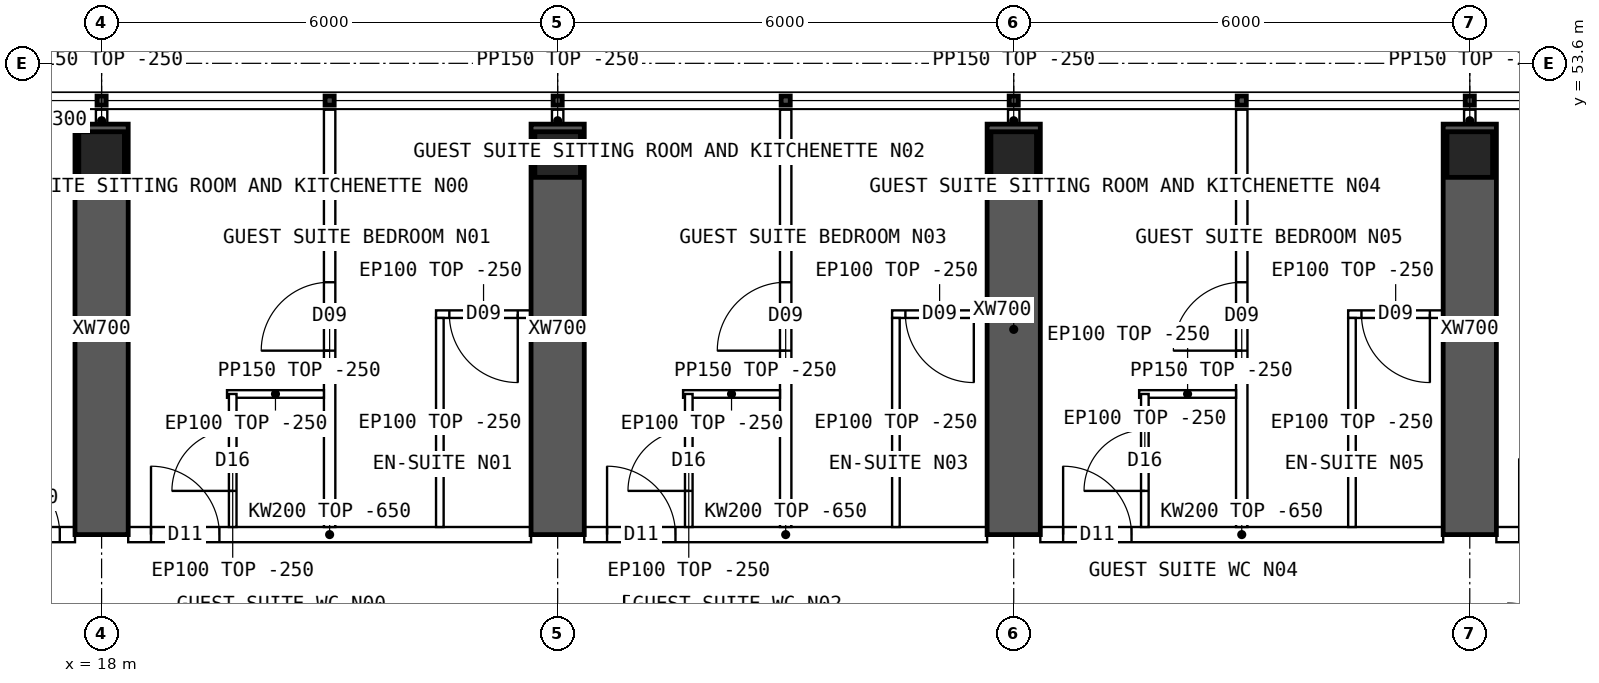
"""IFC4 building model, lengths in metres.
Left out: names, types, materials, properties, quantities, classifications, styles, units other than length and angle.
Written with IfcOpenShell. Run it as: python <this file> out.ifc"""

import sys

from ifc_helpers import new_model, si_unit, direction, frame, frame_2d, origin, origin_2d, place, context, subcontext, project, spatial, polyline, rectangle, hollow_rectangle, outline, extrude, element, fill, save


model = new_model("IFC4")
c1 = context("Model", 3, precision=1e-05, world=origin(), true_north=direction((0.0, 1.0)))
c2 = subcontext(c1, "Body", "Model", "MODEL_VIEW")
j1 = project(units=[si_unit("LENGTHUNIT", "METRE"), si_unit("PLANEANGLEUNIT", "RADIAN")], contexts=[c1])
p1 = place(None, origin())
s1 = spatial("IfcSite", under=j1, at=p1, CompositionType="ELEMENT")
p2 = place(p1, origin())
s2 = spatial("IfcBuilding", under=s1, at=p2, CompositionType="ELEMENT")
p3 = place(p2, frame((0.0, 0.0, 235.3)))
s3 = spatial("IfcBuildingStorey", under=s2, at=p3, CompositionType="ELEMENT", Elevation=235.3)
for number, where, z_axis, x_axis in (
    (1, (18.0, 52.4, 0.0), (0.0, 0.0, 1.0), (1.0, 0.0, 0.0)),
    (2, (24.0, 52.4, 0.0), (0.0, 0.0, 1.0), (1.0, 0.0, 0.0)),
    (3, (30.0, 52.4, 0.0), (0.0, 0.0, 1.0), (1.0, 0.0, 0.0)),
    (4, (36.0, 52.4, 0.0), (0.0, 0.0, 1.0), (1.0, 0.0, 0.0)),
):
    element("IfcColumn", number, at=place(p3, frame(where, z_axis=z_axis, x_axis=x_axis)), inside=s3, PredefinedType="COLUMN", context=c2, shape_type="SweptSolid", body=[
        extrude(hollow_rectangle(XDim=0.6, YDim=0.6, WallThickness=0.06, at=origin_2d()), origin(), (0.0, 0.0, 1.0), 3.75),
    ])
for number, where, z_axis, x_axis in (
    (5, (18.0, 47.4, 0.0), (0.0, 0.0, 1.0), (0.0, 1.0, 0.0)),
    (6, (24.0, 47.4, 0.0), (0.0, 0.0, 1.0), (0.0, 1.0, 0.0)),
    (7, (30.0, 47.4, 0.0), (0.0, 0.0, 1.0), (0.0, 1.0, 0.0)),
    (8, (36.0, 47.4, 0.0), (0.0, 0.0, 1.0), (0.0, 1.0, 0.0)),
):
    element("IfcWall", number, at=place(p3, frame(where, z_axis=z_axis, x_axis=x_axis)), inside=s3, PredefinedType="SHEAR", context=c2, shape_type="SweptSolid", body=[
        extrude(rectangle(XDim=5.4, YDim=0.7, at=frame_2d((2.7, 0.0))), origin(), (0.0, 0.0, 1.0), 3.75),
    ])
p4 = place(p3, frame((17.2, 52.85, 0.0), z_axis=(0.0, 0.0, 1.0), x_axis=(1.0, 0.0, 0.0)))
e9 = element("IfcWall", 9, at=p4, inside=s3, PredefinedType="SOLIDWALL", context=c2, shape_type="SweptSolid", body=[
    extrude(rectangle(XDim=0.45, YDim=0.3, at=frame_2d((0.225, 0.0))), origin(), (0.0, 0.0, 1.0), 3.5),
])
p5 = place(p3, frame((15.6, 47.4, 0.0), z_axis=(0.0, 0.0, 1.0), x_axis=(1.0, 0.0, 0.0)))
e10 = element("IfcWall", 10, at=p5, inside=s3, PredefinedType="SOLIDWALL", context=c2, shape_type="SweptSolid", body=[
    extrude(rectangle(XDim=2.05, YDim=0.2, at=frame_2d((1.025, 0.0))), origin(), (0.0, 0.0, 1.0), 3.5),
])
p6 = place(p5, frame((0.95, 0.0, 0.0)))
e11 = element("IfcOpeningElement", 11, at=p6, cuts=e10, PredefinedType="OPENING", context=c2, shape_type="SweptSolid", body=[
    extrude(rectangle(XDim=0.9, YDim=2.1, at=frame_2d((0.45, 1.05))), frame((0.0, 0.11, 0.0), z_axis=(0.0, -1.0, 0.0), x_axis=(1.0, 0.0, 0.0)), (0.0, 0.0, 1.0), 0.22),
])
p7 = place(p3, frame((18.35, 47.4, 0.0), z_axis=(0.0, 0.0, 1.0), x_axis=(1.0, 0.0, 0.0)))
e12 = element("IfcWall", 12, at=p7, inside=s3, PredefinedType="SOLIDWALL", context=c2, shape_type="SweptSolid", body=[
    extrude(outline(polyline([(0.0, 0.0), (5.3, 0.0), (5.3, 3.1), (0.0, 3.1), (0.0, 0.0)])), frame((0.0, 0.1, 0.0), z_axis=(0.0, -1.0, 0.0), x_axis=(1.0, 0.0, 0.0)), (0.0, 0.0, 1.0), 0.2),
])
p8 = place(p7, frame((0.3, 0.0, 0.0)))
e13 = element("IfcOpeningElement", 13, at=p8, cuts=e12, PredefinedType="OPENING", context=c2, shape_type="SweptSolid", body=[
    extrude(rectangle(XDim=0.9, YDim=2.1, at=frame_2d((0.45, 1.05))), frame((0.0, 0.11, 0.0), z_axis=(0.0, -1.0, 0.0), x_axis=(1.0, 0.0, 0.0)), (0.0, 0.0, 1.0), 0.22),
])
p9 = place(p3, frame((24.35, 47.4, 0.0), z_axis=(0.0, 0.0, 1.0), x_axis=(1.0, 0.0, 0.0)))
e14 = element("IfcWall", 14, at=p9, inside=s3, PredefinedType="SOLIDWALL", context=c2, shape_type="SweptSolid", body=[
    extrude(outline(polyline([(0.0, 0.0), (5.3, 0.0), (5.3, 3.1), (0.0, 3.1), (0.0, 0.0)])), frame((0.0, 0.1, 0.0), z_axis=(0.0, -1.0, 0.0), x_axis=(1.0, 0.0, 0.0)), (0.0, 0.0, 1.0), 0.2),
])
p10 = place(p9, frame((0.3, 0.0, 0.0)))
e15 = element("IfcOpeningElement", 15, at=p10, cuts=e14, PredefinedType="OPENING", context=c2, shape_type="SweptSolid", body=[
    extrude(rectangle(XDim=0.9, YDim=2.1, at=frame_2d((0.45, 1.05))), frame((0.0, 0.11, 0.0), z_axis=(0.0, -1.0, 0.0), x_axis=(1.0, 0.0, 0.0)), (0.0, 0.0, 1.0), 0.22),
])
p11 = place(p3, frame((30.35, 47.4, 0.0), z_axis=(0.0, 0.0, 1.0), x_axis=(1.0, 0.0, 0.0)))
e16 = element("IfcWall", 16, at=p11, inside=s3, PredefinedType="SOLIDWALL", context=c2, shape_type="SweptSolid", body=[
    extrude(outline(polyline([(0.0, 0.0), (5.3, 0.0), (5.3, 3.1), (0.0, 3.1), (0.0, 0.0)])), frame((0.0, 0.1, 0.0), z_axis=(0.0, -1.0, 0.0), x_axis=(1.0, 0.0, 0.0)), (0.0, 0.0, 1.0), 0.2),
])
p12 = place(p11, frame((0.3, 0.0, 0.0)))
e17 = element("IfcOpeningElement", 17, at=p12, cuts=e16, PredefinedType="OPENING", context=c2, shape_type="SweptSolid", body=[
    extrude(rectangle(XDim=0.9, YDim=2.1, at=frame_2d((0.45, 1.05))), frame((0.0, 0.11, 0.0), z_axis=(0.0, -1.0, 0.0), x_axis=(1.0, 0.0, 0.0)), (0.0, 0.0, 1.0), 0.22),
])
p13 = place(p3, frame((36.35, 47.4, 0.0), z_axis=(0.0, 0.0, 1.0), x_axis=(1.0, 0.0, 0.0)))
e18 = element("IfcWall", 18, at=p13, inside=s3, PredefinedType="SOLIDWALL", context=c2, shape_type="SweptSolid", body=[
    extrude(outline(polyline([(0.0, 0.0), (5.3, 0.0), (5.3, 3.1), (0.0, 3.1), (0.0, 0.0)])), frame((0.0, 0.1, 0.0), z_axis=(0.0, -1.0, 0.0), x_axis=(1.0, 0.0, 0.0)), (0.0, 0.0, 1.0), 0.2),
])
p14 = place(p13, frame((0.3, 0.0, 0.0)))
e19 = element("IfcOpeningElement", 19, at=p14, cuts=e18, PredefinedType="OPENING", context=c2, shape_type="SweptSolid", body=[
    extrude(rectangle(XDim=1.0, YDim=2.1, at=frame_2d((0.5, 1.05))), frame((0.0, 0.11, 0.0), z_axis=(0.0, -1.0, 0.0), x_axis=(1.0, 0.0, 0.0)), (0.0, 0.0, 1.0), 0.22),
])
p15 = place(p3, frame((21.0, 52.99, 0.0), z_axis=(0.0, 0.0, 1.0), x_axis=(0.0, -1.0, 0.0)))
e20 = element("IfcWall", 20, at=p15, inside=s3, PredefinedType="PARTITIONING", context=c2, shape_type="SweptSolid", body=[
    extrude(outline(polyline([(0.0, 0.0), (5.49, 0.0), (5.49, 3.1), (5.442, 3.1), (5.44, 3.5), (0.792, 3.5), (0.79, 3.1), (0.392, 3.1), (0.39, 3.5), (0.0, 3.5), (0.0, 0.0)])), frame((0.0, 0.075, 0.0), z_axis=(0.0, -1.0, 0.0), x_axis=(1.0, 0.0, 0.0)), (0.0, 0.0, 1.0), 0.15),
])
p16 = place(p15, frame((2.27, 0.0, 0.0)))
e21 = element("IfcOpeningElement", 21, at=p16, cuts=e20, PredefinedType="OPENING", context=c2, shape_type="SweptSolid", body=[
    extrude(rectangle(XDim=0.9, YDim=2.1, at=frame_2d((0.45, 1.05))), frame((0.0, 0.085, 0.0), z_axis=(0.0, -1.0, 0.0), x_axis=(1.0, 0.0, 0.0)), (0.0, 0.0, 1.0), 0.17),
])
p17 = place(p3, frame((22.4, 50.3, 0.0), z_axis=(0.0, 0.0, 1.0), x_axis=(1.0, 0.0, 0.0)))
e22 = element("IfcWall", 22, at=p17, inside=s3, PredefinedType="PARTITIONING", context=c2, shape_type="SweptSolid", body=[
    extrude(rectangle(XDim=1.25, YDim=0.1, at=frame_2d((0.625, 0.0))), origin(), (0.0, 0.0, 1.0), 3.5),
])
p18 = place(p17, frame((0.175, 0.0, 0.0)))
e23 = element("IfcOpeningElement", 23, at=p18, cuts=e22, PredefinedType="OPENING", context=c2, shape_type="SweptSolid", body=[
    extrude(rectangle(XDim=0.9, YDim=2.1, at=frame_2d((0.45, 1.05))), frame((0.0, 0.06, 0.0), z_axis=(0.0, -1.0, 0.0), x_axis=(1.0, 0.0, 0.0)), (0.0, 0.0, 1.0), 0.12),
])
p19 = place(p3, frame((22.45, 50.25, 0.0), z_axis=(0.0, 0.0, 1.0), x_axis=(0.0, -1.0, 0.0)))
e24 = element("IfcWall", 24, at=p19, inside=s3, PredefinedType="PARTITIONING", context=c2, shape_type="SweptSolid", body=[
    extrude(outline(polyline([(0.0, 0.0), (2.75, 0.0), (2.75, 3.1), (2.702, 3.1), (2.7, 3.5), (0.0, 3.5), (0.0, 0.0)])), frame((0.0, 0.05, 0.0), z_axis=(0.0, -1.0, 0.0), x_axis=(1.0, 0.0, 0.0)), (0.0, 0.0, 1.0), 0.1),
])
p20 = place(p3, frame((19.65, 49.25, 0.0), z_axis=(0.0, 0.0, 1.0), x_axis=(1.0, 0.0, 0.0)))
e25 = element("IfcWall", 25, at=p20, inside=s3, PredefinedType="PARTITIONING", context=c2, shape_type="SweptSolid", body=[
    extrude(rectangle(XDim=1.275, YDim=0.1, at=frame_2d((0.638, 0.0))), origin(), (0.0, 0.0, 1.0), 3.5),
])
p21 = place(p3, frame((19.725, 49.25, 0.0), z_axis=(0.0, 0.0, 1.0), x_axis=(0.0, -1.0, 0.0)))
e26 = element("IfcWall", 26, at=p21, inside=s3, PredefinedType="PARTITIONING", context=c2, shape_type="SweptSolid", body=[
    extrude(outline(polyline([(0.0, 0.0), (1.75, 0.0), (1.75, 3.1), (1.702, 3.1), (1.7, 3.5), (0.0, 3.5), (0.0, 0.0)])), frame((0.0, 0.05, 0.0), z_axis=(0.0, -1.0, 0.0), x_axis=(1.0, 0.0, 0.0)), (0.0, 0.0, 1.0), 0.1),
])
p22 = place(p21, frame((0.475, 0.0, 0.0)))
e27 = element("IfcOpeningElement", 27, at=p22, cuts=e26, PredefinedType="OPENING", context=c2, shape_type="SweptSolid", body=[
    extrude(rectangle(XDim=0.8, YDim=2.1, at=frame_2d((0.4, 1.05))), frame((0.0, 0.06, 0.0), z_axis=(0.0, -1.0, 0.0), x_axis=(1.0, 0.0, 0.0)), (0.0, 0.0, 1.0), 0.12),
])
p23 = place(p3, frame((27.0, 52.99, 0.0), z_axis=(0.0, 0.0, 1.0), x_axis=(0.0, -1.0, 0.0)))
e28 = element("IfcWall", 28, at=p23, inside=s3, PredefinedType="PARTITIONING", context=c2, shape_type="SweptSolid", body=[
    extrude(outline(polyline([(0.0, 0.0), (5.49, 0.0), (5.49, 3.1), (5.442, 3.1), (5.44, 3.5), (0.792, 3.5), (0.79, 3.1), (0.392, 3.1), (0.39, 3.5), (0.0, 3.5), (0.0, 0.0)])), frame((0.0, 0.075, 0.0), z_axis=(0.0, -1.0, 0.0), x_axis=(1.0, 0.0, 0.0)), (0.0, 0.0, 1.0), 0.15),
])
p24 = place(p23, frame((2.27, 0.0, 0.0)))
e29 = element("IfcOpeningElement", 29, at=p24, cuts=e28, PredefinedType="OPENING", context=c2, shape_type="SweptSolid", body=[
    extrude(rectangle(XDim=0.9, YDim=2.1, at=frame_2d((0.45, 1.05))), frame((0.0, 0.085, 0.0), z_axis=(0.0, -1.0, 0.0), x_axis=(1.0, 0.0, 0.0)), (0.0, 0.0, 1.0), 0.17),
])
p25 = place(p3, frame((28.4, 50.3, 0.0), z_axis=(0.0, 0.0, 1.0), x_axis=(1.0, 0.0, 0.0)))
e30 = element("IfcWall", 30, at=p25, inside=s3, PredefinedType="PARTITIONING", context=c2, shape_type="SweptSolid", body=[
    extrude(rectangle(XDim=1.25, YDim=0.1, at=frame_2d((0.625, 0.0))), origin(), (0.0, 0.0, 1.0), 3.5),
])
p26 = place(p25, frame((0.175, 0.0, 0.0)))
e31 = element("IfcOpeningElement", 31, at=p26, cuts=e30, PredefinedType="OPENING", context=c2, shape_type="SweptSolid", body=[
    extrude(rectangle(XDim=0.9, YDim=2.1, at=frame_2d((0.45, 1.05))), frame((0.0, 0.06, 0.0), z_axis=(0.0, -1.0, 0.0), x_axis=(1.0, 0.0, 0.0)), (0.0, 0.0, 1.0), 0.12),
])
p27 = place(p3, frame((28.45, 50.25, 0.0), z_axis=(0.0, 0.0, 1.0), x_axis=(0.0, -1.0, 0.0)))
e32 = element("IfcWall", 32, at=p27, inside=s3, PredefinedType="PARTITIONING", context=c2, shape_type="SweptSolid", body=[
    extrude(outline(polyline([(0.0, 0.0), (2.75, 0.0), (2.75, 3.1), (2.702, 3.1), (2.7, 3.5), (0.0, 3.5), (0.0, 0.0)])), frame((0.0, 0.05, 0.0), z_axis=(0.0, -1.0, 0.0), x_axis=(1.0, 0.0, 0.0)), (0.0, 0.0, 1.0), 0.1),
])
p28 = place(p3, frame((25.65, 49.25, 0.0), z_axis=(0.0, 0.0, 1.0), x_axis=(1.0, 0.0, 0.0)))
e33 = element("IfcWall", 33, at=p28, inside=s3, PredefinedType="PARTITIONING", context=c2, shape_type="SweptSolid", body=[
    extrude(rectangle(XDim=1.275, YDim=0.1, at=frame_2d((0.638, 0.0))), origin(), (0.0, 0.0, 1.0), 3.5),
])
p29 = place(p3, frame((25.725, 49.25, 0.0), z_axis=(0.0, 0.0, 1.0), x_axis=(0.0, -1.0, 0.0)))
e34 = element("IfcWall", 34, at=p29, inside=s3, PredefinedType="PARTITIONING", context=c2, shape_type="SweptSolid", body=[
    extrude(outline(polyline([(0.0, 0.0), (1.75, 0.0), (1.75, 3.1), (1.702, 3.1), (1.7, 3.5), (0.0, 3.5), (0.0, 0.0)])), frame((0.0, 0.05, 0.0), z_axis=(0.0, -1.0, 0.0), x_axis=(1.0, 0.0, 0.0)), (0.0, 0.0, 1.0), 0.1),
])
p30 = place(p29, frame((0.475, 0.0, 0.0)))
e35 = element("IfcOpeningElement", 35, at=p30, cuts=e34, PredefinedType="OPENING", context=c2, shape_type="SweptSolid", body=[
    extrude(rectangle(XDim=0.8, YDim=2.1, at=frame_2d((0.4, 1.05))), frame((0.0, 0.06, 0.0), z_axis=(0.0, -1.0, 0.0), x_axis=(1.0, 0.0, 0.0)), (0.0, 0.0, 1.0), 0.12),
])
p31 = place(p3, frame((33.0, 52.99, 0.0), z_axis=(0.0, 0.0, 1.0), x_axis=(0.0, -1.0, 0.0)))
e36 = element("IfcWall", 36, at=p31, inside=s3, PredefinedType="PARTITIONING", context=c2, shape_type="SweptSolid", body=[
    extrude(outline(polyline([(0.0, 0.0), (5.49, 0.0), (5.49, 3.1), (5.442, 3.1), (5.44, 3.5), (0.792, 3.5), (0.79, 3.1), (0.392, 3.1), (0.39, 3.5), (0.0, 3.5), (0.0, 0.0)])), frame((0.0, 0.075, 0.0), z_axis=(0.0, -1.0, 0.0), x_axis=(1.0, 0.0, 0.0)), (0.0, 0.0, 1.0), 0.15),
])
p32 = place(p31, frame((2.27, 0.0, 0.0)))
e37 = element("IfcOpeningElement", 37, at=p32, cuts=e36, PredefinedType="OPENING", context=c2, shape_type="SweptSolid", body=[
    extrude(rectangle(XDim=0.9, YDim=2.1, at=frame_2d((0.45, 1.05))), frame((0.0, 0.085, 0.0), z_axis=(0.0, -1.0, 0.0), x_axis=(1.0, 0.0, 0.0)), (0.0, 0.0, 1.0), 0.17),
])
p33 = place(p3, frame((34.4, 50.3, 0.0), z_axis=(0.0, 0.0, 1.0), x_axis=(1.0, 0.0, 0.0)))
e38 = element("IfcWall", 38, at=p33, inside=s3, PredefinedType="PARTITIONING", context=c2, shape_type="SweptSolid", body=[
    extrude(rectangle(XDim=1.25, YDim=0.1, at=frame_2d((0.625, 0.0))), origin(), (0.0, 0.0, 1.0), 3.5),
])
p34 = place(p33, frame((0.175, 0.0, 0.0)))
e39 = element("IfcOpeningElement", 39, at=p34, cuts=e38, PredefinedType="OPENING", context=c2, shape_type="SweptSolid", body=[
    extrude(rectangle(XDim=0.9, YDim=2.1, at=frame_2d((0.45, 1.05))), frame((0.0, 0.06, 0.0), z_axis=(0.0, -1.0, 0.0), x_axis=(1.0, 0.0, 0.0)), (0.0, 0.0, 1.0), 0.12),
])
p35 = place(p3, frame((34.45, 50.25, 0.0), z_axis=(0.0, 0.0, 1.0), x_axis=(0.0, -1.0, 0.0)))
e40 = element("IfcWall", 40, at=p35, inside=s3, PredefinedType="PARTITIONING", context=c2, shape_type="SweptSolid", body=[
    extrude(outline(polyline([(0.0, 0.0), (2.75, 0.0), (2.75, 3.1), (2.702, 3.1), (2.7, 3.5), (0.0, 3.5), (0.0, 0.0)])), frame((0.0, 0.05, 0.0), z_axis=(0.0, -1.0, 0.0), x_axis=(1.0, 0.0, 0.0)), (0.0, 0.0, 1.0), 0.1),
])
p36 = place(p3, frame((31.65, 49.25, 0.0), z_axis=(0.0, 0.0, 1.0), x_axis=(1.0, 0.0, 0.0)))
e41 = element("IfcWall", 41, at=p36, inside=s3, PredefinedType="PARTITIONING", context=c2, shape_type="SweptSolid", body=[
    extrude(rectangle(XDim=1.275, YDim=0.1, at=frame_2d((0.638, 0.0))), origin(), (0.0, 0.0, 1.0), 3.5),
])
p37 = place(p3, frame((31.725, 49.25, 0.0), z_axis=(0.0, 0.0, 1.0), x_axis=(0.0, -1.0, 0.0)))
e42 = element("IfcWall", 42, at=p37, inside=s3, PredefinedType="PARTITIONING", context=c2, shape_type="SweptSolid", body=[
    extrude(outline(polyline([(0.0, 0.0), (1.75, 0.0), (1.75, 3.1), (1.702, 3.1), (1.7, 3.5), (0.0, 3.5), (0.0, 0.0)])), frame((0.0, 0.05, 0.0), z_axis=(0.0, -1.0, 0.0), x_axis=(1.0, 0.0, 0.0)), (0.0, 0.0, 1.0), 0.1),
])
p38 = place(p37, frame((0.475, 0.0, 0.0)))
e43 = element("IfcOpeningElement", 43, at=p38, cuts=e42, PredefinedType="OPENING", context=c2, shape_type="SweptSolid", body=[
    extrude(rectangle(XDim=0.8, YDim=2.1, at=frame_2d((0.4, 1.05))), frame((0.0, 0.06, 0.0), z_axis=(0.0, -1.0, 0.0), x_axis=(1.0, 0.0, 0.0)), (0.0, 0.0, 1.0), 0.12),
])
for number, where, z_axis, x_axis in (
    (44, (18.0, 52.7, 0.0), (0.0, 0.0, 1.0), (0.0, 1.0, 0.0)),
    (45, (24.0, 52.7, 0.0), (0.0, 0.0, 1.0), (0.0, 1.0, 0.0)),
    (46, (30.0, 52.7, 0.0), (0.0, 0.0, 1.0), (0.0, 1.0, 0.0)),
    (47, (36.0, 52.7, 0.0), (0.0, 0.0, 1.0), (0.0, 1.0, 0.0)),
):
    element("IfcWall", number, at=place(p3, frame(where, z_axis=z_axis, x_axis=x_axis)), inside=s3, PredefinedType="PARTITIONING", context=c2, shape_type="SweptSolid", body=[
        extrude(rectangle(XDim=0.29, YDim=0.15, at=frame_2d((0.145, 0.0))), origin(), (0.0, 0.0, 1.0), 3.5),
    ])
p39 = place(p8, origin())
e48 = element("IfcDoor", 48, at=p39, inside=s3, OperationType="SINGLE_SWING_LEFT", PredefinedType="DOOR", context=c2, shape_type="SweptSolid", body=[
    extrude(rectangle(XDim=0.9, YDim=2.1, at=frame_2d((0.45, 1.05))), frame((0.0, 0.025, 0.0), z_axis=(0.0, -1.0, 0.0), x_axis=(1.0, 0.0, 0.0)), (0.0, 0.0, 1.0), 0.05),
])
fill(e13, e48)
p40 = place(p18, origin())
e49 = element("IfcDoor", 49, at=p40, inside=s3, OperationType="SINGLE_SWING_RIGHT", PredefinedType="DOOR", context=c2, shape_type="SweptSolid", body=[
    extrude(rectangle(XDim=0.9, YDim=2.1, at=frame_2d((0.45, 1.05))), frame((0.0, 0.025, 0.0), z_axis=(0.0, -1.0, 0.0), x_axis=(1.0, 0.0, 0.0)), (0.0, 0.0, 1.0), 0.05),
])
fill(e23, e49)
p41 = place(p16, origin())
e50 = element("IfcDoor", 50, at=p41, inside=s3, OperationType="SINGLE_SWING_RIGHT", PredefinedType="DOOR", context=c2, shape_type="SweptSolid", body=[
    extrude(rectangle(XDim=0.9, YDim=2.1, at=frame_2d((0.45, 1.05))), frame((0.0, 0.025, 0.0), z_axis=(0.0, -1.0, 0.0), x_axis=(1.0, 0.0, 0.0)), (0.0, 0.0, 1.0), 0.05),
])
fill(e21, e50)
p42 = place(p22, origin())
e51 = element("IfcDoor", 51, at=p42, inside=s3, OperationType="SINGLE_SWING_RIGHT", PredefinedType="DOOR", context=c2, shape_type="SweptSolid", body=[
    extrude(rectangle(XDim=0.8, YDim=2.1, at=frame_2d((0.4, 1.05))), frame((0.0, 0.025, 0.0), z_axis=(0.0, -1.0, 0.0), x_axis=(1.0, 0.0, 0.0)), (0.0, 0.0, 1.0), 0.05),
])
fill(e27, e51)
p43 = place(p10, origin())
e52 = element("IfcDoor", 52, at=p43, inside=s3, OperationType="SINGLE_SWING_LEFT", PredefinedType="DOOR", context=c2, shape_type="SweptSolid", body=[
    extrude(rectangle(XDim=0.9, YDim=2.1, at=frame_2d((0.45, 1.05))), frame((0.0, 0.025, 0.0), z_axis=(0.0, -1.0, 0.0), x_axis=(1.0, 0.0, 0.0)), (0.0, 0.0, 1.0), 0.05),
])
fill(e15, e52)
p44 = place(p26, origin())
e53 = element("IfcDoor", 53, at=p44, inside=s3, OperationType="SINGLE_SWING_RIGHT", PredefinedType="DOOR", context=c2, shape_type="SweptSolid", body=[
    extrude(rectangle(XDim=0.9, YDim=2.1, at=frame_2d((0.45, 1.05))), frame((0.0, 0.025, 0.0), z_axis=(0.0, -1.0, 0.0), x_axis=(1.0, 0.0, 0.0)), (0.0, 0.0, 1.0), 0.05),
])
fill(e31, e53)
p45 = place(p24, origin())
e54 = element("IfcDoor", 54, at=p45, inside=s3, OperationType="SINGLE_SWING_RIGHT", PredefinedType="DOOR", context=c2, shape_type="SweptSolid", body=[
    extrude(rectangle(XDim=0.9, YDim=2.1, at=frame_2d((0.45, 1.05))), frame((0.0, 0.025, 0.0), z_axis=(0.0, -1.0, 0.0), x_axis=(1.0, 0.0, 0.0)), (0.0, 0.0, 1.0), 0.05),
])
fill(e29, e54)
p46 = place(p30, origin())
e55 = element("IfcDoor", 55, at=p46, inside=s3, OperationType="SINGLE_SWING_RIGHT", PredefinedType="DOOR", context=c2, shape_type="SweptSolid", body=[
    extrude(rectangle(XDim=0.8, YDim=2.1, at=frame_2d((0.4, 1.05))), frame((0.0, 0.025, 0.0), z_axis=(0.0, -1.0, 0.0), x_axis=(1.0, 0.0, 0.0)), (0.0, 0.0, 1.0), 0.05),
])
fill(e35, e55)
p47 = place(p12, origin())
e56 = element("IfcDoor", 56, at=p47, inside=s3, OperationType="SINGLE_SWING_LEFT", PredefinedType="DOOR", context=c2, shape_type="SweptSolid", body=[
    extrude(rectangle(XDim=0.9, YDim=2.1, at=frame_2d((0.45, 1.05))), frame((0.0, 0.025, 0.0), z_axis=(0.0, -1.0, 0.0), x_axis=(1.0, 0.0, 0.0)), (0.0, 0.0, 1.0), 0.05),
])
fill(e17, e56)
p48 = place(p34, origin())
e57 = element("IfcDoor", 57, at=p48, inside=s3, OperationType="SINGLE_SWING_RIGHT", PredefinedType="DOOR", context=c2, shape_type="SweptSolid", body=[
    extrude(rectangle(XDim=0.9, YDim=2.1, at=frame_2d((0.45, 1.05))), frame((0.0, 0.025, 0.0), z_axis=(0.0, -1.0, 0.0), x_axis=(1.0, 0.0, 0.0)), (0.0, 0.0, 1.0), 0.05),
])
fill(e39, e57)
p49 = place(p32, origin())
e58 = element("IfcDoor", 58, at=p49, inside=s3, OperationType="SINGLE_SWING_RIGHT", PredefinedType="DOOR", context=c2, shape_type="SweptSolid", body=[
    extrude(rectangle(XDim=0.9, YDim=2.1, at=frame_2d((0.45, 1.05))), frame((0.0, 0.025, 0.0), z_axis=(0.0, -1.0, 0.0), x_axis=(1.0, 0.0, 0.0)), (0.0, 0.0, 1.0), 0.05),
])
fill(e37, e58)
p50 = place(p38, origin())
e59 = element("IfcDoor", 59, at=p50, inside=s3, OperationType="SINGLE_SWING_RIGHT", PredefinedType="DOOR", context=c2, shape_type="SweptSolid", body=[
    extrude(rectangle(XDim=0.8, YDim=2.1, at=frame_2d((0.4, 1.05))), frame((0.0, 0.025, 0.0), z_axis=(0.0, -1.0, 0.0), x_axis=(1.0, 0.0, 0.0)), (0.0, 0.0, 1.0), 0.05),
])
fill(e43, e59)
p51 = place(p6, origin())
e60 = element("IfcDoor", 60, at=p51, inside=s3, OperationType="SINGLE_SWING_LEFT", PredefinedType="DOOR", context=c2, shape_type="SweptSolid", body=[
    extrude(rectangle(XDim=0.9, YDim=2.1, at=frame_2d((0.45, 1.05))), frame((0.0, 0.025, 0.0), z_axis=(0.0, -1.0, 0.0), x_axis=(1.0, 0.0, 0.0)), (0.0, 0.0, 1.0), 0.05),
])
fill(e11, e60)
save(model, sys.argv[1])
